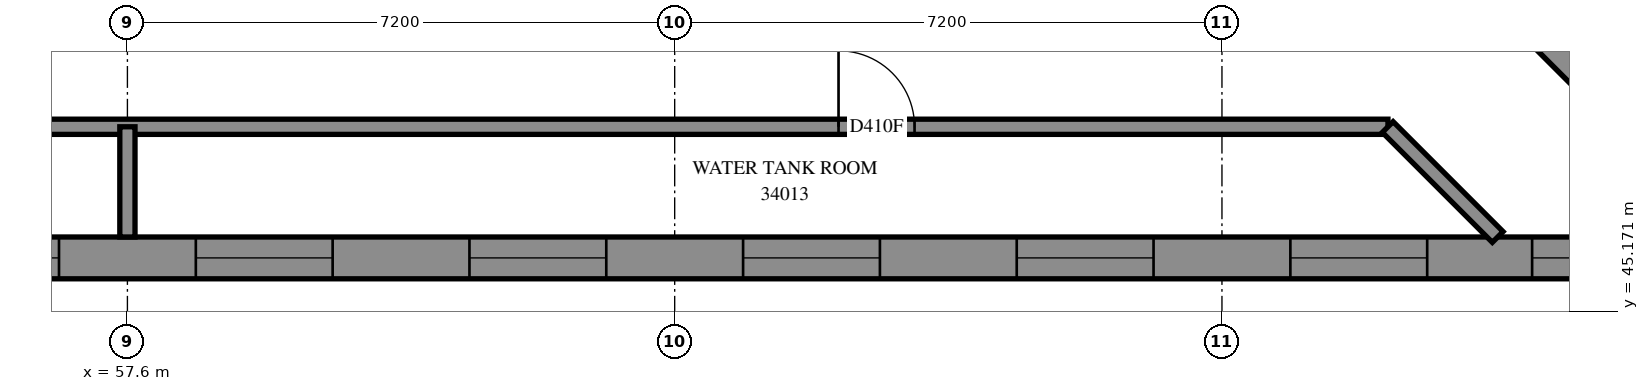
"""IFC4 building model, lengths in metres.
Left out: names, types, materials, properties, quantities, classifications, styles, units other than length and angle.
Written with IfcOpenShell. Run it as: python <this file> out.ifc"""

import sys

from ifc_helpers import new_model, si_unit, direction, frame, frame_2d, origin, place, context, subcontext, project, spatial, polyline, rectangle, outline, extrude, element, fill, save


model = new_model("IFC4")
c1 = context("Model", 3, precision=1e-05, world=origin(), true_north=direction((0.0, 1.0)))
c2 = subcontext(c1, "Body", "Model", "MODEL_VIEW")
j1 = project(units=[si_unit("LENGTHUNIT", "METRE"), si_unit("PLANEANGLEUNIT", "RADIAN")], contexts=[c1])
p1 = place(None, origin())
s1 = spatial("IfcSite", under=j1, at=p1, CompositionType="ELEMENT")
p2 = place(p1, origin())
s2 = spatial("IfcBuilding", under=s1, at=p2, CompositionType="ELEMENT")
p3 = place(p2, frame((0.0, 0.0, 126.2)))
s3 = spatial("IfcBuildingStorey", under=s2, at=p3, CompositionType="ELEMENT", Elevation=126.2)
p4 = place(p3, frame((75.912, 49.337, -0.3), z_axis=(0.0, 0.0, 1.0), x_axis=(0.7071036166, -0.7071099457, 0.0)))
e1 = element("IfcWall", 1, at=p4, inside=s3, PredefinedType="SHEAR", context=c2, shape_type="SweptSolid", body=[
    extrude(rectangle(XDim=15.8, YDim=0.7, at=frame_2d((7.9, 0.0))), origin(), (0.0, 0.0, 1.0), 4.3),
])
p5 = place(p3, frame((53.075, 45.875, 0.0), z_axis=(0.0, 0.0, 1.0), x_axis=(1.0, 0.0, 0.0)))
e2 = element("IfcWall", 2, at=p5, inside=s3, PredefinedType="SOLIDWALL", context=c2, shape_type="SweptSolid", body=[
    extrude(outline(polyline([(-0.275, -0.275), (25.372, -0.275), (25.6, 0.275), (0.275, 0.275), (-0.275, -0.275)])), origin(), (0.0, 0.0, 1.0), 4.7),
])
p6 = place(p5, frame((1.825, 0.0, 0.9)))
e3 = element("IfcOpeningElement", 3, at=p6, cuts=e2, PredefinedType="OPENING", context=c2, shape_type="SweptSolid", body=[
    extrude(rectangle(XDim=1.8, YDim=2.4, at=frame_2d((0.9, 1.2))), frame((0.0, 0.285, 0.0), z_axis=(0.0, -1.0, 0.0), x_axis=(1.0, 0.0, 0.0)), (0.0, 0.0, 1.0), 0.57),
])
p7 = place(p5, frame((5.425, 0.0, 0.9)))
e4 = element("IfcOpeningElement", 4, at=p7, cuts=e2, PredefinedType="OPENING", context=c2, shape_type="SweptSolid", body=[
    extrude(rectangle(XDim=1.8, YDim=2.4, at=frame_2d((0.9, 1.2))), frame((0.0, 0.285, 0.0), z_axis=(0.0, -1.0, 0.0), x_axis=(1.0, 0.0, 0.0)), (0.0, 0.0, 1.0), 0.57),
])
p8 = place(p5, frame((9.025, 0.0, 0.9)))
e5 = element("IfcOpeningElement", 5, at=p8, cuts=e2, PredefinedType="OPENING", context=c2, shape_type="SweptSolid", body=[
    extrude(rectangle(XDim=1.8, YDim=2.4, at=frame_2d((0.9, 1.2))), frame((0.0, 0.285, 0.0), z_axis=(0.0, -1.0, 0.0), x_axis=(1.0, 0.0, 0.0)), (0.0, 0.0, 1.0), 0.57),
])
p9 = place(p5, frame((12.625, 0.0, 0.9)))
e6 = element("IfcOpeningElement", 6, at=p9, cuts=e2, PredefinedType="OPENING", context=c2, shape_type="SweptSolid", body=[
    extrude(rectangle(XDim=1.8, YDim=2.4, at=frame_2d((0.9, 1.2))), frame((0.0, 0.285, 0.0), z_axis=(0.0, -1.0, 0.0), x_axis=(1.0, 0.0, 0.0)), (0.0, 0.0, 1.0), 0.57),
])
p10 = place(p5, frame((16.225, 0.0, 0.9)))
e7 = element("IfcOpeningElement", 7, at=p10, cuts=e2, PredefinedType="OPENING", context=c2, shape_type="SweptSolid", body=[
    extrude(rectangle(XDim=1.8, YDim=2.4, at=frame_2d((0.9, 1.2))), frame((0.0, 0.285, 0.0), z_axis=(0.0, -1.0, 0.0), x_axis=(1.0, 0.0, 0.0)), (0.0, 0.0, 1.0), 0.57),
])
p11 = place(p5, frame((19.825, 0.0, 0.9)))
e8 = element("IfcOpeningElement", 8, at=p11, cuts=e2, PredefinedType="OPENING", context=c2, shape_type="SweptSolid", body=[
    extrude(rectangle(XDim=1.8, YDim=2.4, at=frame_2d((0.9, 1.2))), frame((0.0, 0.285, 0.0), z_axis=(0.0, -1.0, 0.0), x_axis=(1.0, 0.0, 0.0)), (0.0, 0.0, 1.0), 0.57),
])
p12 = place(p5, frame((23.006, 0.0, 0.9)))
e9 = element("IfcOpeningElement", 9, at=p12, cuts=e2, PredefinedType="OPENING", context=c2, shape_type="SweptSolid", body=[
    extrude(rectangle(XDim=1.8, YDim=2.4, at=frame_2d((0.9, 1.2))), frame((0.0, 0.285, 0.0), z_axis=(0.0, -1.0, 0.0), x_axis=(1.0, 0.0, 0.0)), (0.0, 0.0, 1.0), 0.57),
])
p13 = place(p3, frame((54.8, 47.6, 0.0), z_axis=(0.0, 0.0, 1.0), x_axis=(1.0, 0.0, 0.0)))
e10 = element("IfcWall", 10, at=p13, inside=s3, PredefinedType="PARTITIONING", context=c2, shape_type="SweptSolid", body=[
    extrude(rectangle(XDim=19.384, YDim=0.2, at=frame_2d((9.692, 0.0))), origin(), (0.0, 0.0, 1.0), 4.7),
])
p14 = place(p13, frame((12.156, 0.0, 0.0)))
e11 = element("IfcOpeningElement", 11, at=p14, cuts=e10, PredefinedType="OPENING", context=c2, shape_type="SweptSolid", body=[
    extrude(rectangle(XDim=1.0, YDim=2.1, at=frame_2d((0.5, 1.05))), frame((0.0, 0.11, 0.0), z_axis=(0.0, -1.0, 0.0), x_axis=(1.0, 0.0, 0.0)), (0.0, 0.0, 1.0), 0.22),
])
p15 = place(p3, frame((74.181, 47.597, 0.0), z_axis=(0.0, 0.0, 1.0), x_axis=(0.7070823464, -0.7071312152, 0.0)))
e12 = element("IfcWall", 12, at=p15, inside=s3, PredefinedType="PARTITIONING", context=c2, shape_type="SweptSolid", body=[
    extrude(rectangle(XDim=2.046, YDim=0.2, at=frame_2d((1.023, 0.0))), origin(), (0.0, 0.0, 1.0), 4.7),
])
p16 = place(p3, frame((57.6, 46.15, 0.0), z_axis=(0.0, 0.0, 1.0), x_axis=(0.0, 1.0, 0.0)))
e13 = element("IfcWall", 13, at=p16, inside=s3, PredefinedType="PARTITIONING", context=c2, shape_type="SweptSolid", body=[
    extrude(rectangle(XDim=1.45, YDim=0.2, at=frame_2d((0.725, 0.0))), origin(), (0.0, 0.0, 1.0), 4.7),
])
p17 = place(p6, origin())
e14 = element("IfcWindow", 14, at=p17, inside=s3, PartitioningType="SINGLE_PANEL", PredefinedType="WINDOW", context=c2, shape_type="SweptSolid", body=[
    extrude(rectangle(XDim=1.8, YDim=2.4, at=frame_2d((0.9, 1.2))), frame((0.0, 0.155, 0.0), z_axis=(0.0, -1.0, 0.0), x_axis=(1.0, 0.0, 0.0)), (0.0, 0.0, 1.0), 0.06),
])
fill(e3, e14)
p18 = place(p7, origin())
e15 = element("IfcWindow", 15, at=p18, inside=s3, PartitioningType="SINGLE_PANEL", PredefinedType="WINDOW", context=c2, shape_type="SweptSolid", body=[
    extrude(rectangle(XDim=1.8, YDim=2.4, at=frame_2d((0.9, 1.2))), frame((0.0, 0.155, 0.0), z_axis=(0.0, -1.0, 0.0), x_axis=(1.0, 0.0, 0.0)), (0.0, 0.0, 1.0), 0.06),
])
fill(e4, e15)
p19 = place(p8, origin())
e16 = element("IfcWindow", 16, at=p19, inside=s3, PartitioningType="SINGLE_PANEL", PredefinedType="WINDOW", context=c2, shape_type="SweptSolid", body=[
    extrude(rectangle(XDim=1.8, YDim=2.4, at=frame_2d((0.9, 1.2))), frame((0.0, 0.155, 0.0), z_axis=(0.0, -1.0, 0.0), x_axis=(1.0, 0.0, 0.0)), (0.0, 0.0, 1.0), 0.06),
])
fill(e5, e16)
p20 = place(p9, origin())
e17 = element("IfcWindow", 17, at=p20, inside=s3, PartitioningType="SINGLE_PANEL", PredefinedType="WINDOW", context=c2, shape_type="SweptSolid", body=[
    extrude(rectangle(XDim=1.8, YDim=2.4, at=frame_2d((0.9, 1.2))), frame((0.0, 0.155, 0.0), z_axis=(0.0, -1.0, 0.0), x_axis=(1.0, 0.0, 0.0)), (0.0, 0.0, 1.0), 0.06),
])
fill(e6, e17)
p21 = place(p10, origin())
e18 = element("IfcWindow", 18, at=p21, inside=s3, PartitioningType="SINGLE_PANEL", PredefinedType="WINDOW", context=c2, shape_type="SweptSolid", body=[
    extrude(rectangle(XDim=1.8, YDim=2.4, at=frame_2d((0.9, 1.2))), frame((0.0, 0.155, 0.0), z_axis=(0.0, -1.0, 0.0), x_axis=(1.0, 0.0, 0.0)), (0.0, 0.0, 1.0), 0.06),
])
fill(e7, e18)
p22 = place(p11, origin())
e19 = element("IfcWindow", 19, at=p22, inside=s3, PartitioningType="SINGLE_PANEL", PredefinedType="WINDOW", context=c2, shape_type="SweptSolid", body=[
    extrude(rectangle(XDim=1.8, YDim=2.4, at=frame_2d((0.9, 1.2))), frame((0.0, 0.155, 0.0), z_axis=(0.0, -1.0, 0.0), x_axis=(1.0, 0.0, 0.0)), (0.0, 0.0, 1.0), 0.06),
])
fill(e8, e19)
p23 = place(p12, origin())
e20 = element("IfcWindow", 20, at=p23, inside=s3, PartitioningType="SINGLE_PANEL", PredefinedType="WINDOW", context=c2, shape_type="SweptSolid", body=[
    extrude(rectangle(XDim=1.8, YDim=2.4, at=frame_2d((0.9, 1.2))), frame((0.0, 0.155, 0.0), z_axis=(0.0, -1.0, 0.0), x_axis=(1.0, 0.0, 0.0)), (0.0, 0.0, 1.0), 0.06),
])
fill(e9, e20)
p24 = place(p14, origin())
e21 = element("IfcDoor", 21, at=p24, inside=s3, OperationType="SINGLE_SWING_LEFT", PredefinedType="DOOR", context=c2, shape_type="SweptSolid", body=[
    extrude(rectangle(XDim=1.0, YDim=2.1, at=frame_2d((0.5, 1.05))), frame((0.0, 0.025, 0.0), z_axis=(0.0, -1.0, 0.0), x_axis=(1.0, 0.0, 0.0)), (0.0, 0.0, 1.0), 0.05),
])
fill(e11, e21)
save(model, sys.argv[1])
